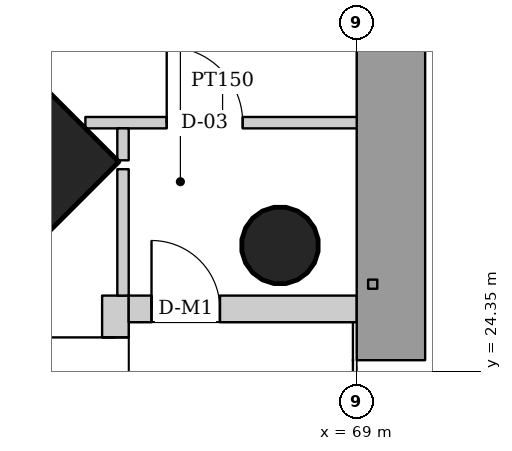
"""IFC4 building model, lengths in metres.
Left out: names, types, materials, properties, quantities, classifications, styles, units other than length and angle.
Written with IfcOpenShell. Run it as: python <this file> out.ifc"""

import sys

from ifc_helpers import new_model, si_unit, direction, frame, frame_2d, origin, origin_2d, place, context, subcontext, project, spatial, rectangle, hollow_circle, extrude, element, fill, save


model = new_model("IFC4")
c1 = context("Model", 3, precision=1e-05, world=origin(), true_north=direction((0.0, 1.0)))
c2 = subcontext(c1, "Body", "Model", "MODEL_VIEW")
j1 = project(units=[si_unit("LENGTHUNIT", "METRE"), si_unit("PLANEANGLEUNIT", "RADIAN")], contexts=[c1])
p1 = place(None, origin())
s1 = spatial("IfcSite", under=j1, at=p1, CompositionType="ELEMENT")
p2 = place(p1, origin())
s2 = spatial("IfcBuilding", under=s1, at=p2, CompositionType="ELEMENT")
p3 = place(p2, frame((0.0, 0.0, 51.4)))
s3 = spatial("IfcBuildingStorey", under=s2, at=p3, CompositionType="ELEMENT", Elevation=51.4)
p4 = place(p3, frame((68.029, 25.971, 0.0), z_axis=(-0.031898107953, 0.031898107953, 0.998981992539), x_axis=(-0.707106781187, -0.707106781187, 0.0)))
e1 = element("IfcColumn", 1, at=p4, inside=s3, PredefinedType="COLUMN", context=c2, shape_type="SweptSolid", body=[
    extrude(hollow_circle(Radius=0.508, WallThickness=0.04, at=origin_2d()), origin(), (0.0, 0.0, 1.0), 3.804),
])
p5 = place(p3, frame((63.928, 27.072, 0.0), z_axis=(-0.031898107953, 0.031898107953, 0.998981992539), x_axis=(-0.707106781187, -0.707106781187, 0.0)))
e2 = element("IfcColumn", 2, at=p5, inside=s3, PredefinedType="COLUMN", context=c2, shape_type="SweptSolid", body=[
    extrude(rectangle(XDim=2.8, YDim=2.8, at=origin_2d()), origin(), (0.0, 0.0, 1.0), 3.804),
])
p6 = place(p3, frame((65.825, 22.0, 0.0), z_axis=(0.0, 0.0, 1.0), x_axis=(0.0, 1.0, 0.0)))
e3 = element("IfcWall", 3, at=p6, inside=s3, PredefinedType="SOLIDWALL", context=c2, shape_type="SweptSolid", body=[
    extrude(rectangle(XDim=3.35, YDim=0.35, at=frame_2d((1.675, 0.0))), origin(), (0.0, 0.0, 1.0), 3.62),
])
p7 = place(p6, frame((1.8, 0.0, 0.0)))
e4 = element("IfcOpeningElement", 4, at=p7, cuts=e3, PredefinedType="OPENING", context=c2, shape_type="SweptSolid", body=[
    extrude(rectangle(XDim=1.0, YDim=2.4, at=frame_2d((0.5, 1.2))), frame((0.0, 0.185, 0.0), z_axis=(0.0, -1.0, 0.0), x_axis=(1.0, 0.0, 0.0)), (0.0, 0.0, 1.0), 0.37),
])
p8 = place(p3, frame((66.0, 25.175, 0.0), z_axis=(0.0, 0.0, 1.0), x_axis=(1.0, 0.0, 0.0)))
e5 = element("IfcWall", 5, at=p8, inside=s3, PredefinedType="SOLIDWALL", context=c2, shape_type="SweptSolid", body=[
    extrude(rectangle(XDim=3.0, YDim=0.35, at=frame_2d((1.5, 0.0))), origin(), (0.0, 0.0, 1.0), 3.62),
])
p9 = place(p8, frame((0.3, 0.0, 0.0)))
e6 = element("IfcOpeningElement", 6, at=p9, cuts=e5, PredefinedType="OPENING", context=c2, shape_type="SweptSolid", body=[
    extrude(rectangle(XDim=0.9, YDim=2.1, at=frame_2d((0.45, 1.05))), frame((0.0, 0.185, 0.0), z_axis=(0.0, -1.0, 0.0), x_axis=(1.0, 0.0, 0.0)), (0.0, 0.0, 1.0), 0.37),
])
p10 = place(p3, frame((65.43, 27.625, 0.0), z_axis=(0.0, 0.0, 1.0), x_axis=(1.0, 0.0, 0.0)))
e7 = element("IfcWall", 7, at=p10, inside=s3, PredefinedType="PARTITIONING", context=c2, shape_type="SweptSolid", body=[
    extrude(rectangle(XDim=3.61, YDim=0.15, at=frame_2d((1.805, 0.0))), origin(), (0.0, 0.0, 1.0), 3.02),
])
p11 = place(p10, frame((1.07, 0.0, 0.0)))
e8 = element("IfcOpeningElement", 8, at=p11, cuts=e7, PredefinedType="OPENING", context=c2, shape_type="SweptSolid", body=[
    extrude(rectangle(XDim=1.0, YDim=2.1, at=frame_2d((0.5, 1.05))), frame((0.0, 0.085, 0.0), z_axis=(0.0, -1.0, 0.0), x_axis=(1.0, 0.0, 0.0)), (0.0, 0.0, 1.0), 0.17),
])
p12 = place(p3, frame((65.925, 27.55, 0.0), z_axis=(0.0, 0.0, 1.0), x_axis=(0.0, -1.0, 0.0)))
e9 = element("IfcWall", 9, at=p12, inside=s3, PredefinedType="PARTITIONING", context=c2, shape_type="SweptSolid", body=[
    extrude(rectangle(XDim=0.42, YDim=0.15, at=frame_2d((0.21, 0.0))), origin(), (0.0, 0.0, 1.0), 3.62),
])
p13 = place(p3, frame((65.925, 27.013, 0.0), z_axis=(0.0, 0.0, 1.0), x_axis=(0.0, -1.0, 0.0)))
e10 = element("IfcWall", 10, at=p13, inside=s3, PredefinedType="PARTITIONING", context=c2, shape_type="SweptSolid", body=[
    extrude(rectangle(XDim=1.663, YDim=0.15, at=frame_2d((0.832, 0.0))), origin(), (0.0, 0.0, 1.0), 3.07),
])
p14 = place(p9, origin())
e11 = element("IfcDoor", 11, at=p14, inside=s3, OperationType="SINGLE_SWING_LEFT", PredefinedType="DOOR", context=c2, shape_type="SweptSolid", body=[
    extrude(rectangle(XDim=0.9, YDim=2.1, at=frame_2d((0.45, 1.05))), frame((0.0, 0.025, 0.0), z_axis=(0.0, -1.0, 0.0), x_axis=(1.0, 0.0, 0.0)), (0.0, 0.0, 1.0), 0.05),
])
fill(e6, e11)
p15 = place(p7, origin())
e12 = element("IfcDoor", 12, at=p15, inside=s3, OperationType="SINGLE_SWING_RIGHT", PredefinedType="DOOR", context=c2, shape_type="SweptSolid", body=[
    extrude(rectangle(XDim=1.0, YDim=2.4, at=frame_2d((0.5, 1.2))), frame((0.0, 0.025, 0.0), z_axis=(0.0, -1.0, 0.0), x_axis=(1.0, 0.0, 0.0)), (0.0, 0.0, 1.0), 0.05),
])
fill(e4, e12)
p16 = place(p11, origin())
e13 = element("IfcDoor", 13, at=p16, inside=s3, OperationType="SINGLE_SWING_LEFT", PredefinedType="DOOR", context=c2, shape_type="SweptSolid", body=[
    extrude(rectangle(XDim=1.0, YDim=2.1, at=frame_2d((0.5, 1.05))), frame((0.0, 0.025, 0.0), z_axis=(0.0, -1.0, 0.0), x_axis=(1.0, 0.0, 0.0)), (0.0, 0.0, 1.0), 0.05),
])
fill(e8, e13)
save(model, sys.argv[1])
